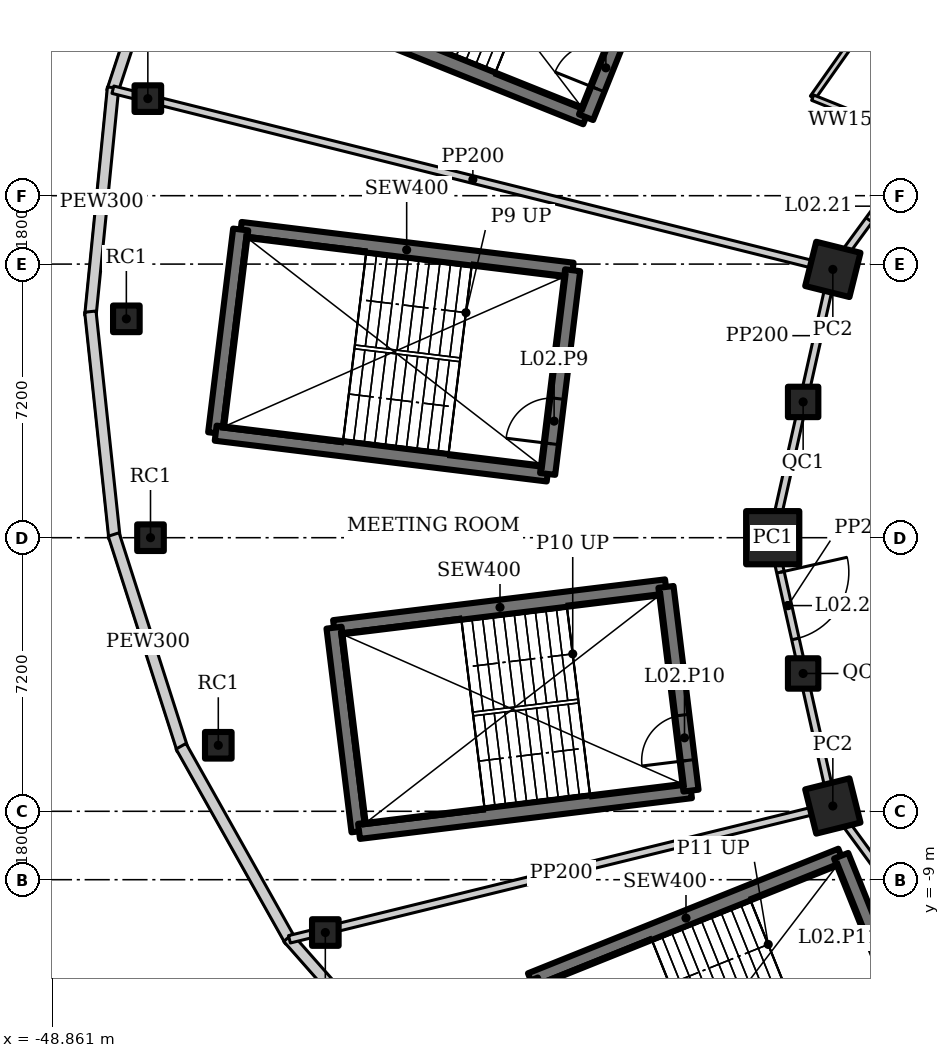
"""IFC4 building model, lengths in metres.
Left out: names, types, materials, properties, quantities, classifications, styles, units other than length and angle.
Written with IfcOpenShell. Run it as: python <this file> out.ifc"""

import sys

from ifc_helpers import new_model, si_unit, direction, frame, frame_2d, origin, origin_2d, place, context, subcontext, project, spatial, rectangle, hollow_rectangle, extrude, element, fill, save


model = new_model("IFC4")
c1 = context("Model", 3, precision=1e-05, world=origin(), true_north=direction((0.0, 1.0)))
c2 = subcontext(c1, "Body", "Model", "MODEL_VIEW")
j1 = project(units=[si_unit("LENGTHUNIT", "METRE"), si_unit("PLANEANGLEUNIT", "RADIAN")], contexts=[c1])
p1 = place(None, origin())
s1 = spatial("IfcSite", under=j1, at=p1, CompositionType="ELEMENT")
p2 = place(p1, origin())
s2 = spatial("IfcBuilding", under=s1, at=p2, CompositionType="ELEMENT")
p3 = place(p2, frame((0.0, 0.0, 14.5)))
s3 = spatial("IfcBuildingStorey", under=s2, at=p3, CompositionType="ELEMENT", Elevation=14.5)
p4 = place(p3, frame((-28.318, 7.06, 0.0), z_axis=(0.0, 0.0, 1.0), x_axis=(0.2419218956, 0.970295726276, 0.0)))
e1 = element("IfcColumn", 1, at=p4, inside=s3, PredefinedType="COLUMN", context=c2, shape_type="SweptSolid", body=[
    extrude(hollow_rectangle(XDim=1.2, YDim=1.2, WallThickness=0.1, at=origin_2d()), origin(), (0.0, 0.0, 1.0), 7.5),
])
p5 = place(p3, frame((-29.9, 0.0, 0.0), z_axis=(0.0, 0.0, 1.0), x_axis=(1.0, 0.0, 0.0)))
e2 = element("IfcColumn", 2, at=p5, inside=s3, PredefinedType="COLUMN", context=c2, shape_type="SweptSolid", body=[
    extrude(hollow_rectangle(XDim=1.4, YDim=1.4, WallThickness=0.1, at=origin_2d()), origin(), (0.0, 0.0, 1.0), 7.5),
])
p6 = place(p3, frame((-28.318, -7.06, 0.0), z_axis=(0.0, 0.0, 1.0), x_axis=(0.970295726276, 0.2419218956, 0.0)))
e3 = element("IfcColumn", 3, at=p6, inside=s3, PredefinedType="COLUMN", context=c2, shape_type="SweptSolid", body=[
    extrude(hollow_rectangle(XDim=1.2, YDim=1.2, WallThickness=0.1, at=origin_2d()), origin(), (0.0, 0.0, 1.0), 7.5),
])
for number, where, z_axis, x_axis in (
    (4, (-29.099, 3.573, 0.0), (0.0, 0.0, 1.0), (1.0, 0.0, 0.0)),
    (5, (-29.099, -3.573, 0.0), (0.0, 0.0, 1.0), (1.0, 0.0, 0.0)),
):
    element("IfcColumn", number, at=place(p3, frame(where, z_axis=z_axis, x_axis=x_axis)), inside=s3, PredefinedType="COLUMN", context=c2, shape_type="SweptSolid", body=[
        extrude(hollow_rectangle(XDim=0.8, YDim=0.8, WallThickness=0.05, at=origin_2d()), origin(), (0.0, 0.0, 1.0), 7.5),
    ])
for number, where, z_axis, x_axis in (
    (6, (-46.908, 5.76, 0.0), (0.0, 0.0, 1.0), (1.0, 0.0, 0.0)),
    (7, (-44.489, -5.462, 0.0), (0.0, 0.0, 1.0), (1.0, 0.0, 0.0)),
    (8, (-46.343, 11.554, 0.0), (0.0, 0.0, 1.0), (1.0, 0.0, 0.0)),
    (9, (-46.272, 0.0, 0.0), (0.0, 0.0, 1.0), (1.0, 0.0, 0.0)),
    (10, (-41.672, -10.39, 0.0), (0.0, 0.0, 1.0), (1.0, 0.0, 0.0)),
):
    element("IfcColumn", number, at=place(p3, frame(where, z_axis=z_axis, x_axis=x_axis)), inside=s3, PredefinedType="COLUMN", context=c2, shape_type="SweptSolid", body=[
        extrude(hollow_rectangle(XDim=0.7, YDim=0.7, WallThickness=0.04, at=origin_2d()), origin(), (0.0, 0.0, 1.0), 7.5),
    ])
p7 = place(p3, frame((-45.158, 18.182, 0.0), z_axis=(0.0, 0.0, 1.0), x_axis=(-0.31263149373, -0.94987449125, 0.0)))
e11 = element("IfcWall", 11, at=p7, inside=s3, PredefinedType="SOLIDWALL", context=c2, shape_type="SweptSolid", body=[
    extrude(rectangle(XDim=6.786, YDim=0.3, at=frame_2d((3.393, 0.0))), origin(), (0.0, 0.0, 1.0), 7.3),
])
p8 = place(p3, frame((-47.257, 11.845, 0.0), z_axis=(0.0, 0.0, 1.0), x_axis=(-0.099051198898, -0.9950823383, 0.0)))
e12 = element("IfcWall", 12, at=p8, inside=s3, PredefinedType="SOLIDWALL", context=c2, shape_type="SweptSolid", body=[
    extrude(rectangle(XDim=6.036, YDim=0.3, at=frame_2d((3.018, 0.0))), origin(), (0.0, 0.0, 1.0), 7.3),
])
p9 = place(p3, frame((-47.855, 5.949, 0.0), z_axis=(0.0, 0.0, 1.0), x_axis=(0.105835648981, -0.99438363593, 0.0)))
e13 = element("IfcWall", 13, at=p9, inside=s3, PredefinedType="SOLIDWALL", context=c2, shape_type="SweptSolid", body=[
    extrude(rectangle(XDim=6.007, YDim=0.3, at=frame_2d((3.003, 0.0))), origin(), (0.0, 0.0, 1.0), 7.3),
])
p10 = place(p3, frame((-47.242, 0.084, 0.0), z_axis=(0.0, 0.0, 1.0), x_axis=(0.304991367091, -0.95235511549, 0.0)))
e14 = element("IfcWall", 14, at=p10, inside=s3, PredefinedType="SOLIDWALL", context=c2, shape_type="SweptSolid", body=[
    extrude(rectangle(XDim=5.956, YDim=0.3, at=frame_2d((2.978, 0.0))), origin(), (0.0, 0.0, 1.0), 7.3),
])
p11 = place(p3, frame((-45.469, -5.488, 0.0), z_axis=(0.0, 0.0, 1.0), x_axis=(0.489563544979, -0.871967622924, 0.0)))
e15 = element("IfcWall", 15, at=p11, inside=s3, PredefinedType="SOLIDWALL", context=c2, shape_type="SweptSolid", body=[
    extrude(rectangle(XDim=5.883, YDim=0.3, at=frame_2d((2.941, 0.0))), origin(), (0.0, 0.0, 1.0), 7.3),
])
p12 = place(p3, frame((-42.654, -10.527, 0.0), z_axis=(0.0, 0.0, 1.0), x_axis=(0.661196672464, -0.75021261008, 0.0)))
e16 = element("IfcWall", 16, at=p12, inside=s3, PredefinedType="SOLIDWALL", context=c2, shape_type="SweptSolid", body=[
    extrude(rectangle(XDim=6.481, YDim=0.3, at=frame_2d((3.24, 0.0))), origin(), (0.0, 0.0, 1.0), 7.3),
])
p13 = place(p3, frame((-25.878, 10.388, 0.0), z_axis=(0.0, 0.0, 1.0), x_axis=(-0.591255937291, -0.806483984105, 0.0)))
e17 = element("IfcWall", 17, at=p13, inside=s3, PredefinedType="SOLIDWALL", context=c2, shape_type="SweptSolid", body=[
    extrude(rectangle(XDim=4.127, YDim=0.2, at=frame_2d((2.063, 0.0))), origin(), (0.0, 0.0, 1.0), 6.896),
])
p14 = place(p13, frame((1.613, 0.0, 0.0)))
e18 = element("IfcOpeningElement", 18, at=p14, cuts=e17, PredefinedType="OPENING", context=c2, shape_type="SweptSolid", body=[
    extrude(rectangle(XDim=0.9, YDim=2.1, at=frame_2d((0.45, 1.05))), frame((0.0, 0.11, 0.0), z_axis=(0.0, -1.0, 0.0), x_axis=(1.0, 0.0, 0.0)), (0.0, 0.0, 1.0), 0.22),
])
p15 = place(p3, frame((-28.318, 7.06, 0.0), z_axis=(0.0, 0.0, 1.0), x_axis=(-0.218673326171, -0.97579812278, 0.0)))
e19 = element("IfcWall", 19, at=p15, inside=s3, PredefinedType="SOLIDWALL", context=c2, shape_type="SweptSolid", body=[
    extrude(rectangle(XDim=3.574, YDim=0.2, at=frame_2d((1.787, 0.0))), origin(), (0.0, 0.0, 1.0), 6.85),
])
p16 = place(p3, frame((-29.099, 3.573, 0.0), z_axis=(0.0, 0.0, 1.0), x_axis=(-0.218631550323, -0.975807483679, 0.0)))
e20 = element("IfcWall", 20, at=p16, inside=s3, PredefinedType="SOLIDWALL", context=c2, shape_type="SweptSolid", body=[
    extrude(rectangle(XDim=3.662, YDim=0.2, at=frame_2d((1.831, 0.0))), origin(), (0.0, 0.0, 1.0), 6.85),
])
p17 = place(p3, frame((-29.9, 0.0, 0.0), z_axis=(0.0, 0.0, 1.0), x_axis=(0.218631550323, -0.975807483679, 0.0)))
e21 = element("IfcWall", 21, at=p17, inside=s3, PredefinedType="SOLIDWALL", context=c2, shape_type="SweptSolid", body=[
    extrude(rectangle(XDim=3.662, YDim=0.2, at=frame_2d((1.831, 0.0))), origin(), (0.0, 0.0, 1.0), 6.772),
])
p18 = place(p17, frame((0.931, 0.0, 0.0)))
e22 = element("IfcOpeningElement", 22, at=p18, cuts=e21, PredefinedType="OPENING", context=c2, shape_type="SweptSolid", body=[
    extrude(rectangle(XDim=1.8, YDim=2.4, at=frame_2d((0.9, 1.2))), frame((0.0, 0.11, 0.0), z_axis=(0.0, -1.0, 0.0), x_axis=(1.0, 0.0, 0.0)), (0.0, 0.0, 1.0), 0.22),
])
p19 = place(p3, frame((-29.099, -3.573, 0.0), z_axis=(0.0, 0.0, 1.0), x_axis=(0.218673326171, -0.97579812278, 0.0)))
e23 = element("IfcWall", 23, at=p19, inside=s3, PredefinedType="SOLIDWALL", context=c2, shape_type="SweptSolid", body=[
    extrude(rectangle(XDim=3.574, YDim=0.2, at=frame_2d((1.787, 0.0))), origin(), (0.0, 0.0, 1.0), 6.896),
])
p20 = place(p3, frame((-28.318, -7.06, 0.0), z_axis=(0.0, 0.0, 1.0), x_axis=(0.591255937291, -0.806483984105, 0.0)))
e24 = element("IfcWall", 24, at=p20, inside=s3, PredefinedType="SOLIDWALL", context=c2, shape_type="SweptSolid", body=[
    extrude(rectangle(XDim=4.127, YDim=0.2, at=frame_2d((2.063, 0.0))), origin(), (0.0, 0.0, 1.0), 5.8),
])
p21 = place(p3, frame((-28.318, 7.06, 0.0), z_axis=(0.0, 0.0, 1.0), x_axis=(-0.970227758662, 0.242194335859, 0.0)))
e25 = element("IfcWall", 25, at=p21, inside=s3, PredefinedType="SOLIDWALL", context=c2, shape_type="SweptSolid", body=[
    extrude(rectangle(XDim=19.526, YDim=0.2, at=frame_2d((9.763, 0.0))), origin(), (0.0, 0.0, 1.0), 5.8),
])
p22 = place(p3, frame((-28.318, -7.06, 0.0), z_axis=(0.0, 0.0, 1.0), x_axis=(-0.971190644534, -0.238303864783, 0.0)))
e26 = element("IfcWall", 26, at=p22, inside=s3, PredefinedType="SOLIDWALL", context=c2, shape_type="SweptSolid", body=[
    extrude(rectangle(XDim=14.723, YDim=0.2, at=frame_2d((7.361, 0.0))), origin(), (0.0, 0.0, 1.0), 5.8),
])
p23 = place(p3, frame((-26.385, 15.073, 0.0), z_axis=(0.0, 0.0, 1.0), x_axis=(-0.576153892924, -0.81734123331, 0.0)))
e27 = element("IfcWall", 27, at=p23, inside=s3, PredefinedType="SOLIDWALL", context=c2, shape_type="SweptSolid", body=[
    extrude(rectangle(XDim=4.275, YDim=0.15, at=frame_2d((2.137, 0.0))), origin(), (0.0, 0.0, 1.0), 7.3),
])
p24 = place(p3, frame((-25.878, 10.388, 0.0), z_axis=(0.0, 0.0, 1.0), x_axis=(-0.928160641083, 0.372179827966, 0.0)))
e28 = element("IfcWall", 28, at=p24, inside=s3, PredefinedType="SOLIDWALL", context=c2, shape_type="SweptSolid", body=[
    extrude(rectangle(XDim=3.2, YDim=0.15, at=frame_2d((1.6, 0.0))), origin(), (0.0, 0.0, 1.0), 7.3),
])
p25 = place(p3, frame((-42.978, 14.344, 0.0), z_axis=(0.0, 0.0, 1.0), x_axis=(0.92801678004, -0.372538395288, 0.0)))
e29 = element("IfcWall", 29, at=p25, inside=s3, PredefinedType="SHEAR", context=c2, shape_type="SweptSolid", body=[
    extrude(rectangle(XDim=8.8, YDim=0.4, at=frame_2d((4.4, 0.0))), origin(), (0.0, 0.0, 1.0), 7.5),
])
p26 = place(p3, frame((-34.812, 11.065, 0.0), z_axis=(0.0, 0.0, 1.0), x_axis=(0.372544066459, 0.928014503414, 0.0)))
e30 = element("IfcWall", 30, at=p26, inside=s3, PredefinedType="SHEAR", context=c2, shape_type="SweptSolid", body=[
    extrude(rectangle(XDim=5.4, YDim=0.4, at=frame_2d((2.7, 0.0))), origin(), (0.0, 0.0, 1.0), 7.5),
])
p27 = place(p26, frame((0.8, 0.0, 0.0)))
e31 = element("IfcOpeningElement", 31, at=p27, cuts=e30, PredefinedType="OPENING", context=c2, shape_type="SweptSolid", body=[
    extrude(rectangle(XDim=1.2, YDim=2.1, at=frame_2d((0.6, 1.05))), frame((0.0, 0.21, 0.0), z_axis=(0.0, -1.0, 0.0), x_axis=(1.0, 0.0, 0.0)), (0.0, 0.0, 1.0), 0.42),
])
p28 = place(p3, frame((-35.165, 7.038, 0.0), z_axis=(0.0, 0.0, 1.0), x_axis=(-0.992545280606, 0.121876437212, 0.0)))
e32 = element("IfcWall", 32, at=p28, inside=s3, PredefinedType="SHEAR", context=c2, shape_type="SweptSolid", body=[
    extrude(rectangle(XDim=8.8, YDim=0.4, at=frame_2d((4.4, 0.0))), origin(), (0.0, 0.0, 1.0), 7.5),
])
p29 = place(p3, frame((-43.899, 8.11, 0.0), z_axis=(0.0, 0.0, 1.0), x_axis=(-0.12184754212, -0.99254882826, 0.0)))
e33 = element("IfcWall", 33, at=p29, inside=s3, PredefinedType="SHEAR", context=c2, shape_type="SweptSolid", body=[
    extrude(rectangle(XDim=5.4, YDim=0.4, at=frame_2d((2.7, 0.0))), origin(), (0.0, 0.0, 1.0), 7.5),
])
p30 = place(p3, frame((-44.557, 2.751, 0.0), z_axis=(0.0, 0.0, 1.0), x_axis=(0.992545280606, -0.121876437212, 0.0)))
e34 = element("IfcWall", 34, at=p30, inside=s3, PredefinedType="SHEAR", context=c2, shape_type="SweptSolid", body=[
    extrude(rectangle(XDim=8.8, YDim=0.4, at=frame_2d((4.4, 0.0))), origin(), (0.0, 0.0, 1.0), 7.5),
])
p31 = place(p3, frame((-35.823, 1.678, 0.0), z_axis=(0.0, 0.0, 1.0), x_axis=(0.12184754212, 0.99254882826, 0.0)))
e35 = element("IfcWall", 35, at=p31, inside=s3, PredefinedType="SHEAR", context=c2, shape_type="SweptSolid", body=[
    extrude(rectangle(XDim=5.4, YDim=0.4, at=frame_2d((2.7, 0.0))), origin(), (0.0, 0.0, 1.0), 7.5),
])
p32 = place(p31, frame((0.8, 0.0, 0.0)))
e36 = element("IfcOpeningElement", 36, at=p32, cuts=e35, PredefinedType="OPENING", context=c2, shape_type="SweptSolid", body=[
    extrude(rectangle(XDim=1.2, YDim=2.1, at=frame_2d((0.6, 1.05))), frame((0.0, 0.21, 0.0), z_axis=(0.0, -1.0, 0.0), x_axis=(1.0, 0.0, 0.0)), (0.0, 0.0, 1.0), 0.42),
])
p33 = place(p3, frame((-32.708, -1.296, 0.0), z_axis=(0.0, 0.0, 1.0), x_axis=(-0.992545692684, -0.121873081252, 0.0)))
e37 = element("IfcWall", 37, at=p33, inside=s3, PredefinedType="SHEAR", context=c2, shape_type="SweptSolid", body=[
    extrude(rectangle(XDim=8.8, YDim=0.4, at=frame_2d((4.4, 0.0))), origin(), (0.0, 0.0, 1.0), 7.5),
])
p34 = place(p3, frame((-41.443, -2.368, 0.0), z_axis=(0.0, 0.0, 1.0), x_axis=(0.121892082937, -0.992543359314, 0.0)))
e38 = element("IfcWall", 38, at=p34, inside=s3, PredefinedType="SHEAR", context=c2, shape_type="SweptSolid", body=[
    extrude(rectangle(XDim=5.4, YDim=0.4, at=frame_2d((2.7, 0.0))), origin(), (0.0, 0.0, 1.0), 7.5),
])
p35 = place(p3, frame((-40.785, -7.728, 0.0), z_axis=(0.0, 0.0, 1.0), x_axis=(0.992545280606, 0.121876437212, 0.0)))
e39 = element("IfcWall", 39, at=p35, inside=s3, PredefinedType="SHEAR", context=c2, shape_type="SweptSolid", body=[
    extrude(rectangle(XDim=8.8, YDim=0.4, at=frame_2d((4.4, 0.0))), origin(), (0.0, 0.0, 1.0), 7.5),
])
p36 = place(p3, frame((-32.051, -6.656, 0.0), z_axis=(0.0, 0.0, 1.0), x_axis=(-0.12184754212, 0.99254882826, 0.0)))
e40 = element("IfcWall", 40, at=p36, inside=s3, PredefinedType="SHEAR", context=c2, shape_type="SweptSolid", body=[
    extrude(rectangle(XDim=5.4, YDim=0.4, at=frame_2d((2.7, 0.0))), origin(), (0.0, 0.0, 1.0), 7.5),
])
p37 = place(p36, frame((0.8, 0.0, 0.0)))
e41 = element("IfcOpeningElement", 41, at=p37, cuts=e40, PredefinedType="OPENING", context=c2, shape_type="SweptSolid", body=[
    extrude(rectangle(XDim=1.2, YDim=2.1, at=frame_2d((0.6, 1.05))), frame((0.0, 0.21, 0.0), z_axis=(0.0, -1.0, 0.0), x_axis=(1.0, 0.0, 0.0)), (0.0, 0.0, 1.0), 0.42),
])
p38 = place(p3, frame((-28.099, -8.371, 0.0), z_axis=(0.0, 0.0, 1.0), x_axis=(-0.92801678004, -0.372538395288, 0.0)))
e42 = element("IfcWall", 42, at=p38, inside=s3, PredefinedType="SHEAR", context=c2, shape_type="SweptSolid", body=[
    extrude(rectangle(XDim=8.8, YDim=0.4, at=frame_2d((4.4, 0.0))), origin(), (0.0, 0.0, 1.0), 7.5),
])
p39 = place(p3, frame((-26.087, -13.382, 0.0), z_axis=(0.0, 0.0, 1.0), x_axis=(-0.372544066459, 0.928014503414, 0.0)))
e43 = element("IfcWall", 43, at=p39, inside=s3, PredefinedType="SHEAR", context=c2, shape_type="SweptSolid", body=[
    extrude(rectangle(XDim=5.4, YDim=0.4, at=frame_2d((2.7, 0.0))), origin(), (0.0, 0.0, 1.0), 7.5),
])
p40 = place(p39, frame((0.8, 0.0, 0.0)))
e44 = element("IfcOpeningElement", 44, at=p40, cuts=e43, PredefinedType="OPENING", context=c2, shape_type="SweptSolid", body=[
    extrude(rectangle(XDim=1.2, YDim=2.1, at=frame_2d((0.6, 1.05))), frame((0.0, 0.21, 0.0), z_axis=(0.0, -1.0, 0.0), x_axis=(1.0, 0.0, 0.0)), (0.0, 0.0, 1.0), 0.42),
])
p41 = place(p14, origin())
e45 = element("IfcDoor", 45, at=p41, inside=s3, OperationType="SINGLE_SWING_LEFT", PredefinedType="DOOR", context=c2, shape_type="SweptSolid", body=[
    extrude(rectangle(XDim=0.9, YDim=2.1, at=frame_2d((0.45, 1.05))), frame((0.0, 0.025, 0.0), z_axis=(0.0, -1.0, 0.0), x_axis=(1.0, 0.0, 0.0)), (0.0, 0.0, 1.0), 0.05),
])
fill(e18, e45)
p42 = place(p18, origin())
e46 = element("IfcDoor", 46, at=p42, inside=s3, OperationType="DOUBLE_DOOR_DOUBLE_SWING", PredefinedType="DOOR", context=c2, shape_type="SweptSolid", body=[
    extrude(rectangle(XDim=1.8, YDim=2.4, at=frame_2d((0.9, 1.2))), frame((0.0, 0.025, 0.0), z_axis=(0.0, -1.0, 0.0), x_axis=(1.0, 0.0, 0.0)), (0.0, 0.0, 1.0), 0.05),
])
fill(e22, e46)
p43 = place(p27, origin())
e47 = element("IfcDoor", 47, at=p43, inside=s3, OperationType="SINGLE_SWING_RIGHT", PredefinedType="DOOR", context=c2, shape_type="SweptSolid", body=[
    extrude(rectangle(XDim=1.2, YDim=2.1, at=frame_2d((0.6, 1.05))), frame((0.0, 0.025, 0.0), z_axis=(0.0, -1.0, 0.0), x_axis=(1.0, 0.0, 0.0)), (0.0, 0.0, 1.0), 0.05),
])
fill(e31, e47)
p44 = place(p32, origin())
e48 = element("IfcDoor", 48, at=p44, inside=s3, OperationType="SINGLE_SWING_RIGHT", PredefinedType="DOOR", context=c2, shape_type="SweptSolid", body=[
    extrude(rectangle(XDim=1.2, YDim=2.1, at=frame_2d((0.6, 1.05))), frame((0.0, 0.025, 0.0), z_axis=(0.0, -1.0, 0.0), x_axis=(1.0, 0.0, 0.0)), (0.0, 0.0, 1.0), 0.05),
])
fill(e36, e48)
p45 = place(p37, origin())
e49 = element("IfcDoor", 49, at=p45, inside=s3, OperationType="SINGLE_SWING_RIGHT", PredefinedType="DOOR", context=c2, shape_type="SweptSolid", body=[
    extrude(rectangle(XDim=1.2, YDim=2.1, at=frame_2d((0.6, 1.05))), frame((0.0, 0.025, 0.0), z_axis=(0.0, -1.0, 0.0), x_axis=(1.0, 0.0, 0.0)), (0.0, 0.0, 1.0), 0.05),
])
fill(e41, e49)
save(model, sys.argv[1])
